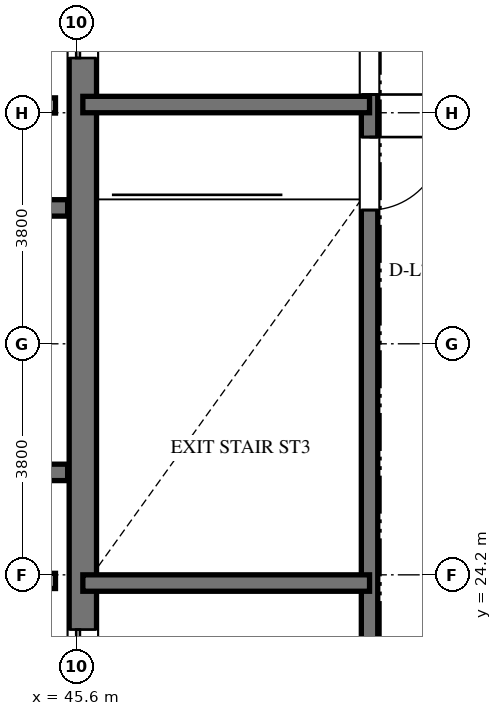
"""IFC4 building model, lengths in metres.
Left out: names, types, materials, properties, quantities, classifications, styles, units other than length and angle.
Written with IfcOpenShell. Run it as: python <this file> out.ifc"""

import sys

from ifc_helpers import new_model, si_unit, direction, frame, frame_2d, origin, place, context, subcontext, project, spatial, rectangle, extrude, element, fill, save


model = new_model("IFC4")
c1 = context("Model", 3, precision=1e-05, world=origin(), true_north=direction((0.0, 1.0)))
c2 = subcontext(c1, "Body", "Model", "MODEL_VIEW")
j1 = project(units=[si_unit("LENGTHUNIT", "METRE"), si_unit("PLANEANGLEUNIT", "RADIAN")], contexts=[c1])
p1 = place(None, origin())
s1 = spatial("IfcSite", under=j1, at=p1, CompositionType="ELEMENT")
p2 = place(p1, origin())
s2 = spatial("IfcBuilding", under=s1, at=p2, CompositionType="ELEMENT")
p3 = place(p2, frame((0.0, 0.0, 298.8)))
s3 = spatial("IfcBuildingStorey", under=s2, at=p3, CompositionType="ELEMENT", Elevation=298.8)
p4 = place(p3, frame((45.7, 20.95, 0.0), z_axis=(0.0, 0.0, 1.0), x_axis=(0.0, 1.0, 0.0)))
e1 = element("IfcWall", 1, at=p4, inside=s3, PredefinedType="SHEAR", context=c2, shape_type="SweptSolid", body=[
    extrude(rectangle(XDim=14.1, YDim=0.45, at=frame_2d((7.05, 0.0))), origin(), (0.0, 0.0, 1.0), 3.648),
])
p5 = place(p4, frame((11.75, 0.0, 0.0)))
e2 = element("IfcOpeningElement", 2, at=p5, cuts=e1, PredefinedType="OPENING", context=c2, shape_type="SweptSolid", body=[
    extrude(rectangle(XDim=1.4, YDim=2.3, at=frame_2d((0.7, 1.15))), frame((0.0, 0.235, 0.0), z_axis=(0.0, -1.0, 0.0), x_axis=(1.0, 0.0, 0.0)), (0.0, 0.0, 1.0), 0.47),
])
p6 = place(p4, frame((0.95, 0.0, 0.0)))
e3 = element("IfcOpeningElement", 3, at=p6, cuts=e1, PredefinedType="OPENING", context=c2, shape_type="SweptSolid", body=[
    extrude(rectangle(XDim=1.4, YDim=2.3, at=frame_2d((0.7, 1.15))), frame((0.0, 0.235, 0.0), z_axis=(0.0, -1.0, 0.0), x_axis=(1.0, 0.0, 0.0)), (0.0, 0.0, 1.0), 0.47),
])
p7 = place(p3, frame((37.465, 30.235, 0.0), z_axis=(0.0, 0.0, 1.0), x_axis=(1.0, 0.0, 0.0)))
e4 = element("IfcWall", 4, at=p7, inside=s3, PredefinedType="SHEAR", context=c2, shape_type="SweptSolid", body=[
    extrude(rectangle(XDim=7.985, YDim=0.27, at=frame_2d((3.992, 0.0))), origin(), (0.0, 0.0, 1.0), 3.648),
])
p8 = place(p7, frame((6.455, 0.0, 0.0)))
e5 = element("IfcOpeningElement", 5, at=p8, cuts=e4, PredefinedType="OPENING", context=c2, shape_type="SweptSolid", body=[
    extrude(rectangle(XDim=1.2, YDim=2.15, at=frame_2d((0.6, 1.075))), frame((0.0, 0.145, 0.0), z_axis=(0.0, -1.0, 0.0), x_axis=(1.0, 0.0, 0.0)), (0.0, 0.0, 1.0), 0.29),
])
p9 = place(p3, frame((37.465, 25.885, 0.0), z_axis=(0.0, 0.0, 1.0), x_axis=(1.0, 0.0, 0.0)))
e6 = element("IfcWall", 6, at=p9, inside=s3, PredefinedType="SHEAR", context=c2, shape_type="SweptSolid", body=[
    extrude(rectangle(XDim=7.985, YDim=0.27, at=frame_2d((3.992, 0.0))), origin(), (0.0, 0.0, 1.0), 3.648),
])
for number, where, z_axis, x_axis in (
    (7, (42.95, 31.92, 0.0), (0.0, 0.0, 1.0), (1.0, 0.0, 0.0)),
    (8, (42.95, 24.1, 0.0), (0.0, 0.0, 1.0), (1.0, 0.0, 0.0)),
):
    element("IfcWall", number, at=place(p3, frame(where, z_axis=z_axis, x_axis=x_axis)), inside=s3, PredefinedType="SOLIDWALL", context=c2, shape_type="SweptSolid", body=[
        extrude(rectangle(XDim=2.3, YDim=0.25, at=frame_2d((1.15, 0.0))), origin(), (0.0, 0.0, 1.0), 3.328),
    ])
p10 = place(p3, frame((50.415, 35.845, 0.0), z_axis=(0.0, 0.0, 1.0), x_axis=(0.0, -1.0, 0.0)))
e9 = element("IfcWall", 9, at=p10, inside=s3, PredefinedType="SHEAR", context=c2, shape_type="SweptSolid", body=[
    extrude(rectangle(XDim=15.825, YDim=0.27, at=frame_2d((7.913, 0.0))), origin(), (0.0, 0.0, 1.0), 3.648),
])
p11 = place(p10, frame((4.445, 0.0, 0.0)))
e10 = element("IfcOpeningElement", 10, at=p11, cuts=e9, PredefinedType="OPENING", context=c2, shape_type="SweptSolid", body=[
    extrude(rectangle(XDim=1.2, YDim=2.15, at=frame_2d((0.6, 1.075))), frame((0.0, 0.145, 0.0), z_axis=(0.0, -1.0, 0.0), x_axis=(1.0, 0.0, 0.0)), (0.0, 0.0, 1.0), 0.29),
])
p12 = place(p10, frame((2.445, 0.0, 0.0)))
e11 = element("IfcOpeningElement", 11, at=p12, cuts=e9, PredefinedType="OPENING", context=c2, shape_type="SweptSolid", body=[
    extrude(rectangle(XDim=1.3, YDim=2.2, at=frame_2d((0.65, 1.1))), frame((0.0, 0.145, 0.0), z_axis=(0.0, -1.0, 0.0), x_axis=(1.0, 0.0, 0.0)), (0.0, 0.0, 1.0), 0.29),
])
p13 = place(p10, frame((13.095, 0.0, 0.0)))
e12 = element("IfcOpeningElement", 12, at=p13, cuts=e9, PredefinedType="OPENING", context=c2, shape_type="SweptSolid", body=[
    extrude(rectangle(XDim=1.3, YDim=2.2, at=frame_2d((0.65, 1.1))), frame((0.0, 0.145, 0.0), z_axis=(0.0, -1.0, 0.0), x_axis=(1.0, 0.0, 0.0)), (0.0, 0.0, 1.0), 0.29),
])
for number, where, z_axis, x_axis in (
    (13, (45.7, 31.935, 0.0), (0.0, 0.0, 1.0), (1.0, 0.0, 0.0)),
    (14, (45.7, 24.065, 0.0), (0.0, 0.0, 1.0), (1.0, 0.0, 0.0)),
):
    element("IfcWall", number, at=place(p3, frame(where, z_axis=z_axis, x_axis=x_axis)), inside=s3, PredefinedType="SHEAR", context=c2, shape_type="SweptSolid", body=[
        extrude(rectangle(XDim=4.715, YDim=0.27, at=frame_2d((2.357, 0.0))), origin(), (0.0, 0.0, 1.0), 3.648),
    ])
p14 = place(p5, origin())
e15 = element("IfcDoor", 15, at=p14, inside=s3, OperationType="SLIDING_TO_LEFT", PredefinedType="DOOR", context=c2, shape_type="SweptSolid", body=[
    extrude(rectangle(XDim=1.4, YDim=2.3, at=frame_2d((0.7, 1.15))), frame((0.0, 0.025, 0.0), z_axis=(0.0, -1.0, 0.0), x_axis=(1.0, 0.0, 0.0)), (0.0, 0.0, 1.0), 0.05),
])
fill(e2, e15)
p15 = place(p6, origin())
e16 = element("IfcDoor", 16, at=p15, inside=s3, OperationType="SLIDING_TO_LEFT", PredefinedType="DOOR", context=c2, shape_type="SweptSolid", body=[
    extrude(rectangle(XDim=1.4, YDim=2.3, at=frame_2d((0.7, 1.15))), frame((0.0, 0.025, 0.0), z_axis=(0.0, -1.0, 0.0), x_axis=(1.0, 0.0, 0.0)), (0.0, 0.0, 1.0), 0.05),
])
fill(e3, e16)
p16 = place(p11, origin())
e17 = element("IfcDoor", 17, at=p16, inside=s3, OperationType="SINGLE_SWING_LEFT", PredefinedType="DOOR", context=c2, shape_type="SweptSolid", body=[
    extrude(rectangle(XDim=1.2, YDim=2.15, at=frame_2d((0.6, 1.075))), frame((0.0, 0.025, 0.0), z_axis=(0.0, -1.0, 0.0), x_axis=(1.0, 0.0, 0.0)), (0.0, 0.0, 1.0), 0.05),
])
fill(e10, e17)
p17 = place(p12, origin())
e18 = element("IfcDoor", 18, at=p17, inside=s3, OperationType="SINGLE_SWING_RIGHT", PredefinedType="DOOR", context=c2, shape_type="SweptSolid", body=[
    extrude(rectangle(XDim=1.3, YDim=2.2, at=frame_2d((0.65, 1.1))), frame((0.0, 0.025, 0.0), z_axis=(0.0, -1.0, 0.0), x_axis=(1.0, 0.0, 0.0)), (0.0, 0.0, 1.0), 0.05),
])
fill(e11, e18)
save(model, sys.argv[1])
